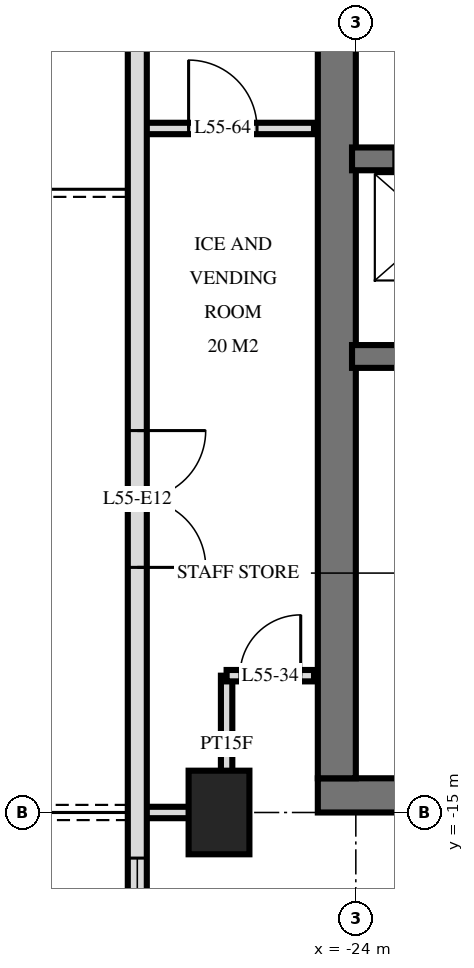
"""IFC4 building model, lengths in metres.
Left out: names, types, materials, properties, quantities, classifications, styles, units other than length and angle.
Written with IfcOpenShell. Run it as: python <this file> out.ifc"""

import sys

from ifc_helpers import new_model, si_unit, direction, frame, frame_2d, origin, origin_2d, place, context, subcontext, project, spatial, rectangle, extrude, element, fill, save


model = new_model("IFC4")
c1 = context("Model", 3, precision=1e-05, world=origin(), true_north=direction((0.0, 1.0)))
c2 = subcontext(c1, "Body", "Model", "MODEL_VIEW")
j1 = project(units=[si_unit("LENGTHUNIT", "METRE"), si_unit("PLANEANGLEUNIT", "RADIAN")], contexts=[c1])
p1 = place(None, origin())
s1 = spatial("IfcSite", under=j1, at=p1, CompositionType="ELEMENT")
p2 = place(p1, origin())
s2 = spatial("IfcBuilding", under=s1, at=p2, CompositionType="ELEMENT")
p3 = place(p2, frame((0.0, 0.0, 211.6)))
s3 = spatial("IfcBuildingStorey", under=s2, at=p3, CompositionType="ELEMENT", Elevation=211.6)
p4 = place(p3, frame((-25.8, -15.0, 0.0), z_axis=(0.0, 0.0, 1.0), x_axis=(0.0, 1.0, 0.0)))
e1 = element("IfcColumn", 1, at=p4, inside=s3, PredefinedType="COLUMN", context=c2, shape_type="SweptSolid", body=[
    extrude(rectangle(XDim=1.1, YDim=0.8, at=origin_2d()), origin(), (0.0, 0.0, 1.0), 3.5),
])
p5 = place(p3, frame((-24.5, -14.775, 0.0), z_axis=(0.0, 0.0, 1.0), x_axis=(1.0, 0.0, 0.0)))
e2 = element("IfcWall", 2, at=p5, inside=s3, PredefinedType="SHEAR", context=c2, shape_type="SweptSolid", body=[
    extrude(rectangle(XDim=14.5, YDim=0.45, at=frame_2d((7.25, 0.0))), origin(), (0.0, 0.0, 1.0), 3.5),
])
p6 = place(p5, frame((6.2, 0.0, 0.0)))
e3 = element("IfcOpeningElement", 3, at=p6, cuts=e2, PredefinedType="OPENING", context=c2, shape_type="SweptSolid", body=[
    extrude(rectangle(XDim=1.2, YDim=2.1, at=frame_2d((0.6, 1.05))), frame((0.0, 0.235, 0.0), z_axis=(0.0, -1.0, 0.0), x_axis=(1.0, 0.0, 0.0)), (0.0, 0.0, 1.0), 0.47),
])
p7 = place(p5, frame((9.25, 0.0, 0.0)))
e4 = element("IfcOpeningElement", 4, at=p7, cuts=e2, PredefinedType="OPENING", context=c2, shape_type="SweptSolid", body=[
    extrude(rectangle(XDim=1.1, YDim=2.1, at=frame_2d((0.55, 1.05))), frame((0.0, 0.235, 0.0), z_axis=(0.0, -1.0, 0.0), x_axis=(1.0, 0.0, 0.0)), (0.0, 0.0, 1.0), 0.47),
])
p8 = place(p5, frame((3.5, 0.0, 0.0)))
e5 = element("IfcOpeningElement", 5, at=p8, cuts=e2, PredefinedType="OPENING", context=c2, shape_type="SweptSolid", body=[
    extrude(rectangle(XDim=0.9, YDim=2.1, at=frame_2d((0.45, 1.05))), frame((0.0, 0.235, 0.0), z_axis=(0.0, -1.0, 0.0), x_axis=(1.0, 0.0, 0.0)), (0.0, 0.0, 1.0), 0.47),
])
p9 = place(p5, frame((1.05, 0.0, 0.0)))
e6 = element("IfcOpeningElement", 6, at=p9, cuts=e2, PredefinedType="OPENING", context=c2, shape_type="SweptSolid", body=[
    extrude(rectangle(XDim=1.0, YDim=2.1, at=frame_2d((0.5, 1.05))), frame((0.0, 0.235, 0.0), z_axis=(0.0, -1.0, 0.0), x_axis=(1.0, 0.0, 0.0)), (0.0, 0.0, 1.0), 0.47),
])
p10 = place(p3, frame((-24.25, -14.55, 0.0), z_axis=(0.0, 0.0, 1.0), x_axis=(0.0, 1.0, 0.0)))
e7 = element("IfcWall", 7, at=p10, inside=s3, PredefinedType="SHEAR", context=c2, shape_type="SweptSolid", body=[
    extrude(rectangle(XDim=14.1, YDim=0.5, at=frame_2d((7.05, 0.0))), origin(), (0.0, 0.0, 1.0), 3.5),
])
p11 = place(p3, frame((-24.05, -6.4, 0.0), z_axis=(0.0, 0.0, 1.0), x_axis=(1.0, 0.0, 0.0)))
e8 = element("IfcWall", 8, at=p11, inside=s3, PredefinedType="SHEAR", context=c2, shape_type="SweptSolid", body=[
    extrude(rectangle(XDim=13.7, YDim=0.3, at=frame_2d((6.85, 0.0))), origin(), (0.0, 0.0, 1.0), 3.5),
])
p12 = place(p11, frame((0.55, 0.0, 0.0)))
e9 = element("IfcOpeningElement", 9, at=p12, cuts=e8, PredefinedType="OPENING", context=c2, shape_type="SweptSolid", body=[
    extrude(rectangle(XDim=1.1, YDim=2.1, at=frame_2d((0.55, 1.05))), frame((0.0, 0.16, 0.0), z_axis=(0.0, -1.0, 0.0), x_axis=(1.0, 0.0, 0.0)), (0.0, 0.0, 1.0), 0.32),
])
p13 = place(p11, frame((5.8, 0.0, 0.0)))
e10 = element("IfcOpeningElement", 10, at=p13, cuts=e8, PredefinedType="OPENING", context=c2, shape_type="SweptSolid", body=[
    extrude(rectangle(XDim=1.1, YDim=2.1, at=frame_2d((0.55, 1.05))), frame((0.0, 0.16, 0.0), z_axis=(0.0, -1.0, 0.0), x_axis=(1.0, 0.0, 0.0)), (0.0, 0.0, 1.0), 0.32),
])
p14 = place(p3, frame((-24.05, -9.0, 0.0), z_axis=(0.0, 0.0, 1.0), x_axis=(1.0, 0.0, 0.0)))
e11 = element("IfcWall", 11, at=p14, inside=s3, PredefinedType="SHEAR", context=c2, shape_type="SweptSolid", body=[
    extrude(rectangle(XDim=13.7, YDim=0.3, at=frame_2d((6.85, 0.0))), origin(), (0.0, 0.0, 1.0), 3.5),
])
p15 = place(p14, frame((8.8, 0.0, 0.0)))
e12 = element("IfcOpeningElement", 12, at=p15, cuts=e11, PredefinedType="OPENING", context=c2, shape_type="SweptSolid", body=[
    extrude(rectangle(XDim=1.1, YDim=2.1, at=frame_2d((0.55, 1.05))), frame((0.0, 0.16, 0.0), z_axis=(0.0, -1.0, 0.0), x_axis=(1.0, 0.0, 0.0)), (0.0, 0.0, 1.0), 0.32),
])
p16 = place(p3, frame((-26.875, -3.325, 0.0), z_axis=(0.0, 0.0, 1.0), x_axis=(0.0, -1.0, 0.0)))
e13 = element("IfcWall", 13, at=p16, inside=s3, PredefinedType="SOLIDWALL", context=c2, shape_type="SweptSolid", body=[
    extrude(rectangle(XDim=21.551, YDim=0.25, at=frame_2d((10.775, 0.0))), origin(), (0.0, 0.0, 1.0), 3.22),
])
p17 = place(p16, frame((6.65, 0.0, 0.0)))
e14 = element("IfcOpeningElement", 14, at=p17, cuts=e13, PredefinedType="OPENING", context=c2, shape_type="SweptSolid", body=[
    extrude(rectangle(XDim=1.8, YDim=2.4, at=frame_2d((0.9, 1.2))), frame((0.0, 0.135, 0.0), z_axis=(0.0, -1.0, 0.0), x_axis=(1.0, 0.0, 0.0)), (0.0, 0.0, 1.0), 0.27),
])
p18 = place(p16, frame((12.275, 0.0, 0.9)))
e15 = element("IfcOpeningElement", 15, at=p18, cuts=e13, PredefinedType="OPENING", context=c2, shape_type="SweptSolid", body=[
    extrude(rectangle(XDim=1.2, YDim=1.5, at=frame_2d((0.6, 0.75))), frame((0.0, 0.135, 0.0), z_axis=(0.0, -1.0, 0.0), x_axis=(1.0, 0.0, 0.0)), (0.0, 0.0, 1.0), 0.27),
])
p19 = place(p16, frame((14.675, 0.0, 0.0)))
e16 = element("IfcOpeningElement", 16, at=p19, cuts=e13, PredefinedType="OPENING", context=c2, shape_type="SweptSolid", body=[
    extrude(rectangle(XDim=1.8, YDim=2.4, at=frame_2d((0.9, 1.2))), frame((0.0, 0.135, 0.0), z_axis=(0.0, -1.0, 0.0), x_axis=(1.0, 0.0, 0.0)), (0.0, 0.0, 1.0), 0.27),
])
p20 = place(p16, frame((18.875, 0.0, 0.0)))
e17 = element("IfcOpeningElement", 17, at=p20, cuts=e13, PredefinedType="OPENING", context=c2, shape_type="SweptSolid", body=[
    extrude(rectangle(XDim=1.8, YDim=2.4, at=frame_2d((0.9, 1.2))), frame((0.0, 0.135, 0.0), z_axis=(0.0, -1.0, 0.0), x_axis=(1.0, 0.0, 0.0)), (0.0, 0.0, 1.0), 0.27),
])
p21 = place(p3, frame((-25.7, -15.0, 0.0), z_axis=(0.0, 0.0, 1.0), x_axis=(0.0, 1.0, 0.0)))
e18 = element("IfcWall", 18, at=p21, inside=s3, PredefinedType="PARTITIONING", context=c2, shape_type="SweptSolid", body=[
    extrude(rectangle(XDim=1.8, YDim=0.15, at=frame_2d((0.9, 0.0))), origin(), (0.0, 0.0, 1.0), 3.22),
])
p22 = place(p3, frame((-26.82, -15.0, 0.0), z_axis=(0.0, 0.0, 1.0), x_axis=(1.0, 0.0, 0.0)))
e19 = element("IfcWall", 19, at=p22, inside=s3, PredefinedType="PARTITIONING", context=c2, shape_type="SweptSolid", body=[
    extrude(rectangle(XDim=1.12, YDim=0.15, at=frame_2d((0.56, 0.0))), origin(), (0.0, 0.0, 1.0), 3.22),
])
p23 = place(p3, frame((-25.7, -13.2, 0.0), z_axis=(0.0, 0.0, 1.0), x_axis=(1.0, 0.0, 0.0)))
e20 = element("IfcWall", 20, at=p23, inside=s3, PredefinedType="PARTITIONING", context=c2, shape_type="SweptSolid", body=[
    extrude(rectangle(XDim=1.15, YDim=0.15, at=frame_2d((0.575, 0.0))), origin(), (0.0, 0.0, 1.0), 3.22),
])
p24 = place(p23, frame((0.175, 0.0, 0.0)))
e21 = element("IfcOpeningElement", 21, at=p24, cuts=e20, PredefinedType="OPENING", context=c2, shape_type="SweptSolid", body=[
    extrude(rectangle(XDim=0.8, YDim=2.1, at=frame_2d((0.4, 1.05))), frame((0.0, 0.085, 0.0), z_axis=(0.0, -1.0, 0.0), x_axis=(1.0, 0.0, 0.0)), (0.0, 0.0, 1.0), 0.17),
])
p25 = place(p3, frame((-26.82, -6.0, 0.0), z_axis=(0.0, 0.0, 1.0), x_axis=(1.0, 0.0, 0.0)))
e22 = element("IfcWall", 22, at=p25, inside=s3, PredefinedType="PARTITIONING", context=c2, shape_type="SweptSolid", body=[
    extrude(rectangle(XDim=2.27, YDim=0.15, at=frame_2d((1.135, 0.0))), origin(), (0.0, 0.0, 1.0), 3.22),
])
p26 = place(p25, frame((0.62, 0.0, 0.0)))
e23 = element("IfcOpeningElement", 23, at=p26, cuts=e22, PredefinedType="OPENING", context=c2, shape_type="SweptSolid", body=[
    extrude(rectangle(XDim=0.9, YDim=2.1, at=frame_2d((0.45, 1.05))), frame((0.0, 0.085, 0.0), z_axis=(0.0, -1.0, 0.0), x_axis=(1.0, 0.0, 0.0)), (0.0, 0.0, 1.0), 0.17),
])
p27 = place(p17, origin())
e24 = element("IfcDoor", 24, at=p27, inside=s3, OperationType="DOUBLE_DOOR_SINGLE_SWING", PredefinedType="DOOR", context=c2, shape_type="SweptSolid", body=[
    extrude(rectangle(XDim=1.8, YDim=2.4, at=frame_2d((0.9, 1.2))), frame((0.0, 0.025, 0.0), z_axis=(0.0, -1.0, 0.0), x_axis=(1.0, 0.0, 0.0)), (0.0, 0.0, 1.0), 0.05),
])
fill(e14, e24)
p28 = place(p18, origin())
e25 = element("IfcWindow", 25, at=p28, inside=s3, PartitioningType="SINGLE_PANEL", PredefinedType="WINDOW", context=c2, shape_type="SweptSolid", body=[
    extrude(rectangle(XDim=1.2, YDim=1.5, at=frame_2d((0.6, 0.75))), frame((0.0, 0.03, 0.0), z_axis=(0.0, -1.0, 0.0), x_axis=(1.0, 0.0, 0.0)), (0.0, 0.0, 1.0), 0.06),
])
fill(e15, e25)
p29 = place(p24, origin())
e26 = element("IfcDoor", 26, at=p29, inside=s3, OperationType="SINGLE_SWING_LEFT", PredefinedType="DOOR", context=c2, shape_type="SweptSolid", body=[
    extrude(rectangle(XDim=0.8, YDim=2.1, at=frame_2d((0.4, 1.05))), frame((0.0, 0.025, 0.0), z_axis=(0.0, -1.0, 0.0), x_axis=(1.0, 0.0, 0.0)), (0.0, 0.0, 1.0), 0.05),
])
fill(e21, e26)
p30 = place(p26, origin())
e27 = element("IfcDoor", 27, at=p30, inside=s3, OperationType="SINGLE_SWING_RIGHT", PredefinedType="DOOR", context=c2, shape_type="SweptSolid", body=[
    extrude(rectangle(XDim=0.9, YDim=2.1, at=frame_2d((0.45, 1.05))), frame((0.0, 0.025, 0.0), z_axis=(0.0, -1.0, 0.0), x_axis=(1.0, 0.0, 0.0)), (0.0, 0.0, 1.0), 0.05),
])
fill(e23, e27)
save(model, sys.argv[1])
